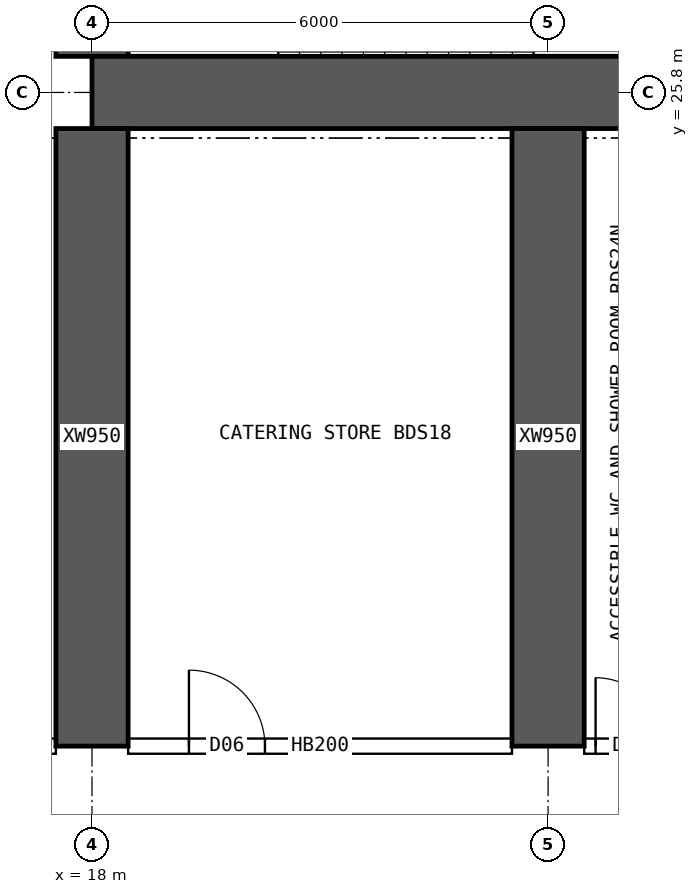
"""IFC4 building model, lengths in metres.
Left out: names, types, materials, properties, quantities, classifications, styles, units other than length and angle.
Written with IfcOpenShell. Run it as: python <this file> out.ifc"""

import sys

from ifc_helpers import new_model, si_unit, direction, frame, frame_2d, origin, place, context, subcontext, project, spatial, rectangle, extrude, element, fill, save


model = new_model("IFC4")
c1 = context("Model", 3, precision=1e-05, world=origin(), true_north=direction((0.0, 1.0)))
c2 = subcontext(c1, "Body", "Model", "MODEL_VIEW")
j1 = project(units=[si_unit("LENGTHUNIT", "METRE"), si_unit("PLANEANGLEUNIT", "RADIAN")], contexts=[c1])
p1 = place(None, origin())
s1 = spatial("IfcSite", under=j1, at=p1, CompositionType="ELEMENT")
p2 = place(p1, origin())
s2 = spatial("IfcBuilding", under=s1, at=p2, CompositionType="ELEMENT")
p3 = place(p2, frame((0.0, 0.0, 140.35)))
s3 = spatial("IfcBuildingStorey", under=s2, at=p3, CompositionType="ELEMENT", Elevation=140.35)
p4 = place(p3, frame((18.0, 25.8, 0.0), z_axis=(0.0, 0.0, 1.0), x_axis=(1.0, 0.0, 0.0)))
e1 = element("IfcWall", 1, at=p4, inside=s3, PredefinedType="SHEAR", context=c2, shape_type="SweptSolid", body=[
    extrude(rectangle(XDim=48.0, YDim=0.95, at=frame_2d((24.0, 0.0))), origin(), (0.0, 0.0, 1.0), 4.5),
])
p5 = place(p3, frame((18.0, 26.275, 0.0), z_axis=(0.0, 0.0, 1.0), x_axis=(0.0, 1.0, 0.0)))
e2 = element("IfcWall", 2, at=p5, inside=s3, PredefinedType="SHEAR", context=c2, shape_type="SweptSolid", body=[
    extrude(rectangle(XDim=11.45, YDim=0.95, at=frame_2d((5.725, 0.0))), origin(), (0.0, 0.0, 1.0), 4.5),
])
p6 = place(p5, frame((5.025, 0.0, 0.0)))
e3 = element("IfcOpeningElement", 3, at=p6, cuts=e2, PredefinedType="OPENING", context=c2, shape_type="SweptSolid", body=[
    extrude(rectangle(XDim=1.2, YDim=2.1, at=frame_2d((0.6, 1.05))), frame((0.0, 0.485, 0.0), z_axis=(0.0, -1.0, 0.0), x_axis=(1.0, 0.0, 0.0)), (0.0, 0.0, 1.0), 0.97),
])
for number, where, z_axis, x_axis in (
    (4, (18.0, 17.2, 0.0), (0.0, 0.0, 1.0), (0.0, 1.0, 0.0)),
    (5, (24.0, 17.2, 0.0), (0.0, 0.0, 1.0), (0.0, 1.0, 0.0)),
):
    element("IfcWall", number, at=place(p3, frame(where, z_axis=z_axis, x_axis=x_axis)), inside=s3, PredefinedType="SHEAR", context=c2, shape_type="SweptSolid", body=[
        extrude(rectangle(XDim=8.125, YDim=0.95, at=frame_2d((4.062, 0.0))), origin(), (0.0, 0.0, 1.0), 4.5),
    ])
p7 = place(p3, frame((15.6, 17.2, 0.0), z_axis=(0.0, 0.0, 1.0), x_axis=(1.0, 0.0, 0.0)))
e6 = element("IfcWall", 6, at=p7, inside=s3, PredefinedType="SOLIDWALL", context=c2, shape_type="SweptSolid", body=[
    extrude(rectangle(XDim=1.925, YDim=0.2, at=frame_2d((0.962, 0.0))), origin(), (0.0, 0.0, 1.0), 4.25),
])
p8 = place(p7, frame((0.625, 0.0, 0.0)))
e7 = element("IfcOpeningElement", 7, at=p8, cuts=e6, PredefinedType="OPENING", context=c2, shape_type="SweptSolid", body=[
    extrude(rectangle(XDim=1.2, YDim=2.1, at=frame_2d((0.6, 1.05))), frame((0.0, 0.11, 0.0), z_axis=(0.0, -1.0, 0.0), x_axis=(1.0, 0.0, 0.0)), (0.0, 0.0, 1.0), 0.22),
])
p9 = place(p3, frame((18.475, 17.2, 0.0), z_axis=(0.0, 0.0, 1.0), x_axis=(1.0, 0.0, 0.0)))
e8 = element("IfcWall", 8, at=p9, inside=s3, PredefinedType="SOLIDWALL", context=c2, shape_type="SweptSolid", body=[
    extrude(rectangle(XDim=5.05, YDim=0.2, at=frame_2d((2.525, 0.0))), origin(), (0.0, 0.0, 1.0), 4.25),
])
p10 = place(p9, frame((0.8, 0.0, 0.0)))
e9 = element("IfcOpeningElement", 9, at=p10, cuts=e8, PredefinedType="OPENING", context=c2, shape_type="SweptSolid", body=[
    extrude(rectangle(XDim=1.0, YDim=2.1, at=frame_2d((0.5, 1.05))), frame((0.0, 0.11, 0.0), z_axis=(0.0, -1.0, 0.0), x_axis=(1.0, 0.0, 0.0)), (0.0, 0.0, 1.0), 0.22),
])
p11 = place(p3, frame((24.475, 17.2, 0.0), z_axis=(0.0, 0.0, 1.0), x_axis=(1.0, 0.0, 0.0)))
e10 = element("IfcWall", 10, at=p11, inside=s3, PredefinedType="SOLIDWALL", context=c2, shape_type="SweptSolid", body=[
    extrude(rectangle(XDim=5.05, YDim=0.2, at=frame_2d((2.525, 0.0))), origin(), (0.0, 0.0, 1.0), 4.25),
])
p12 = place(p11, frame((0.15, 0.0, 0.0)))
e11 = element("IfcOpeningElement", 11, at=p12, cuts=e10, PredefinedType="OPENING", context=c2, shape_type="SweptSolid", body=[
    extrude(rectangle(XDim=0.9, YDim=2.1, at=frame_2d((0.45, 1.05))), frame((0.0, 0.11, 0.0), z_axis=(0.0, -1.0, 0.0), x_axis=(1.0, 0.0, 0.0)), (0.0, 0.0, 1.0), 0.22),
])
p13 = place(p11, frame((2.425, 0.0, 0.0)))
e12 = element("IfcOpeningElement", 12, at=p13, cuts=e10, PredefinedType="OPENING", context=c2, shape_type="SweptSolid", body=[
    extrude(rectangle(XDim=0.9, YDim=2.1, at=frame_2d((0.45, 1.05))), frame((0.0, 0.11, 0.0), z_axis=(0.0, -1.0, 0.0), x_axis=(1.0, 0.0, 0.0)), (0.0, 0.0, 1.0), 0.22),
])
p14 = place(p10, origin())
e13 = element("IfcDoor", 13, at=p14, inside=s3, OperationType="SINGLE_SWING_LEFT", PredefinedType="DOOR", context=c2, shape_type="SweptSolid", body=[
    extrude(rectangle(XDim=1.0, YDim=2.1, at=frame_2d((0.5, 1.05))), frame((0.0, 0.025, 0.0), z_axis=(0.0, -1.0, 0.0), x_axis=(1.0, 0.0, 0.0)), (0.0, 0.0, 1.0), 0.05),
])
fill(e9, e13)
p15 = place(p12, origin())
e14 = element("IfcDoor", 14, at=p15, inside=s3, OperationType="SINGLE_SWING_LEFT", PredefinedType="DOOR", context=c2, shape_type="SweptSolid", body=[
    extrude(rectangle(XDim=0.9, YDim=2.1, at=frame_2d((0.45, 1.05))), frame((0.0, 0.025, 0.0), z_axis=(0.0, -1.0, 0.0), x_axis=(1.0, 0.0, 0.0)), (0.0, 0.0, 1.0), 0.05),
])
fill(e11, e14)
save(model, sys.argv[1])
